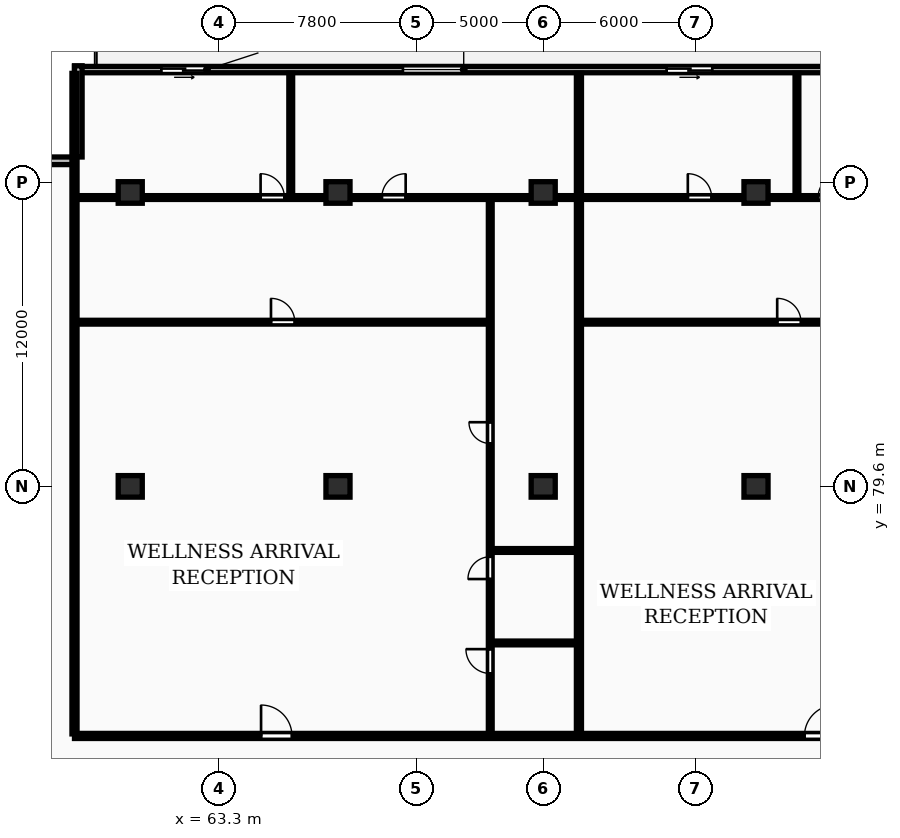
"""IFC4 building model, lengths in metres.
Left out: names, types, materials, properties, quantities, classifications, styles, units other than length and angle.
Written with IfcOpenShell. Run it as: python <this file> out.ifc"""

import sys

from ifc_helpers import new_model, si_unit, direction, frame, frame_2d, origin, origin_2d, place, context, subcontext, project, spatial, rectangle, extrude, element, fill, save


model = new_model("IFC4")
c1 = context("Model", 3, precision=1e-05, world=origin(), true_north=direction((0.0, 1.0)))
c2 = subcontext(c1, "Body", "Model", "MODEL_VIEW")
j1 = project(units=[si_unit("LENGTHUNIT", "METRE"), si_unit("PLANEANGLEUNIT", "RADIAN")], contexts=[c1])
p1 = place(None, origin())
s1 = spatial("IfcSite", under=j1, at=p1, CompositionType="ELEMENT")
p2 = place(p1, origin())
s2 = spatial("IfcBuilding", under=s1, at=p2, CompositionType="ELEMENT")
p3 = place(p2, frame((0.0, 0.0, 119.8)))
s3 = spatial("IfcBuildingStorey", under=s2, at=p3, CompositionType="ELEMENT", Elevation=119.8)
for number, where, z_axis, x_axis in (
    (1, (59.8, 79.6, 0.0), (0.0, 0.0, 1.0), (1.0, 0.0, 0.0)),
    (2, (59.8, 91.2, 0.0), (0.0, 0.0, 1.0), (1.0, 0.0, 0.0)),
    (3, (68.0, 79.6, 0.0), (0.0, 0.0, 1.0), (1.0, 0.0, 0.0)),
    (4, (68.0, 91.2, 0.0), (0.0, 0.0, 1.0), (1.0, 0.0, 0.0)),
    (5, (76.1, 79.6, 0.0), (0.0, 0.0, 1.0), (1.0, 0.0, 0.0)),
    (6, (76.1, 91.2, 0.0), (0.0, 0.0, 1.0), (1.0, 0.0, 0.0)),
    (7, (84.5, 79.6, 0.0), (0.0, 0.0, 1.0), (1.0, 0.0, 0.0)),
    (8, (84.5, 91.2, 0.0), (0.0, 0.0, 1.0), (1.0, 0.0, 0.0)),
):
    element("IfcColumn", number, at=place(p3, frame(where, z_axis=z_axis, x_axis=x_axis)), inside=s3, PredefinedType="COLUMN", context=c2, shape_type="SweptSolid", body=[
        extrude(rectangle(XDim=0.95, YDim=0.85, at=origin_2d()), origin(), (0.0, 0.0, 1.0), 3.25),
    ])
p4 = place(p3, frame((130.6, 96.05, 0.0), z_axis=(0.0, 0.0, 1.0), x_axis=(-1.0, 0.0, 0.0)))
e9 = element("IfcWall", 9, at=p4, inside=s3, PredefinedType="STANDARD", context=c2, shape_type="SweptSolid", body=[
    extrude(rectangle(XDim=73.0, YDim=0.25, at=frame_2d((36.5, 0.0))), origin(), (0.0, 0.0, 1.0), 2.97),
])
p5 = place(p4, frame((67.772, 0.0, 0.0)))
e10 = element("IfcOpeningElement", 10, at=p5, cuts=e9, PredefinedType="OPENING", context=c2, shape_type="SweptSolid", body=[
    extrude(rectangle(XDim=1.8, YDim=2.2, at=frame_2d((0.9, 1.1))), frame((0.0, 0.135, 0.0), z_axis=(0.0, -1.0, 0.0), x_axis=(1.0, 0.0, 0.0)), (0.0, 0.0, 1.0), 0.27),
])
p6 = place(p4, frame((57.637, 0.0, 0.85)))
e11 = element("IfcOpeningElement", 11, at=p6, cuts=e9, PredefinedType="OPENING", context=c2, shape_type="SweptSolid", body=[
    extrude(rectangle(XDim=2.4, YDim=1.9, at=frame_2d((1.2, 0.95))), frame((0.0, 0.135, 0.0), z_axis=(0.0, -1.0, 0.0), x_axis=(1.0, 0.0, 0.0)), (0.0, 0.0, 1.0), 0.27),
])
p7 = place(p4, frame((47.827, 0.0, 0.0)))
e12 = element("IfcOpeningElement", 12, at=p7, cuts=e9, PredefinedType="OPENING", context=c2, shape_type="SweptSolid", body=[
    extrude(rectangle(XDim=1.8, YDim=2.2, at=frame_2d((0.9, 1.1))), frame((0.0, 0.135, 0.0), z_axis=(0.0, -1.0, 0.0), x_axis=(1.0, 0.0, 0.0)), (0.0, 0.0, 1.0), 0.27),
])
p8 = place(p4, frame((37.736, 0.0, 0.85)))
e13 = element("IfcOpeningElement", 13, at=p8, cuts=e9, PredefinedType="OPENING", context=c2, shape_type="SweptSolid", body=[
    extrude(rectangle(XDim=2.4, YDim=1.9, at=frame_2d((1.2, 0.95))), frame((0.0, 0.135, 0.0), z_axis=(0.0, -1.0, 0.0), x_axis=(1.0, 0.0, 0.0)), (0.0, 0.0, 1.0), 0.27),
])
p9 = place(p4, frame((21.9, 0.0, 0.85)))
e14 = element("IfcOpeningElement", 14, at=p9, cuts=e9, PredefinedType="OPENING", context=c2, shape_type="SweptSolid", body=[
    extrude(rectangle(XDim=2.4, YDim=1.9, at=frame_2d((1.2, 0.95))), frame((0.0, 0.135, 0.0), z_axis=(0.0, -1.0, 0.0), x_axis=(1.0, 0.0, 0.0)), (0.0, 0.0, 1.0), 0.27),
])
p10 = place(p4, frame((28.584, 0.0, 0.0)))
e15 = element("IfcOpeningElement", 15, at=p10, cuts=e9, PredefinedType="OPENING", context=c2, shape_type="SweptSolid", body=[
    extrude(rectangle(XDim=1.8, YDim=2.2, at=frame_2d((0.9, 1.1))), frame((0.0, 0.135, 0.0), z_axis=(0.0, -1.0, 0.0), x_axis=(1.0, 0.0, 0.0)), (0.0, 0.0, 1.0), 0.27),
])
p11 = place(p4, frame((16.689, 0.0, 0.85)))
e16 = element("IfcOpeningElement", 16, at=p11, cuts=e9, PredefinedType="OPENING", context=c2, shape_type="SweptSolid", body=[
    extrude(rectangle(XDim=2.4, YDim=1.9, at=frame_2d((1.2, 0.95))), frame((0.0, 0.135, 0.0), z_axis=(0.0, -1.0, 0.0), x_axis=(1.0, 0.0, 0.0)), (0.0, 0.0, 1.0), 0.27),
])
p12 = place(p4, frame((5.475, 0.0, 0.85)))
e17 = element("IfcOpeningElement", 17, at=p12, cuts=e9, PredefinedType="OPENING", context=c2, shape_type="SweptSolid", body=[
    extrude(rectangle(XDim=1.8, YDim=1.8, at=frame_2d((0.9, 0.9))), frame((0.0, 0.135, 0.0), z_axis=(0.0, -1.0, 0.0), x_axis=(1.0, 0.0, 0.0)), (0.0, 0.0, 1.0), 0.27),
])
p13 = place(p4, frame((10.889, 0.0, 0.0)))
e18 = element("IfcOpeningElement", 18, at=p13, cuts=e9, PredefinedType="OPENING", context=c2, shape_type="SweptSolid", body=[
    extrude(rectangle(XDim=1.8, YDim=2.2, at=frame_2d((0.9, 1.1))), frame((0.0, 0.135, 0.0), z_axis=(0.0, -1.0, 0.0), x_axis=(1.0, 0.0, 0.0)), (0.0, 0.0, 1.0), 0.27),
])
p14 = place(p4, frame((1.025, 0.0, 0.85)))
e19 = element("IfcOpeningElement", 19, at=p14, cuts=e9, PredefinedType="OPENING", context=c2, shape_type="SweptSolid", body=[
    extrude(rectangle(XDim=2.4, YDim=1.9, at=frame_2d((1.2, 0.95))), frame((0.0, 0.135, 0.0), z_axis=(0.0, -1.0, 0.0), x_axis=(1.0, 0.0, 0.0)), (0.0, 0.0, 1.0), 0.27),
])
p15 = place(p3, frame((57.75, 96.2, 0.0), z_axis=(0.0, 0.0, 1.0), x_axis=(0.0, -1.0, 0.0)))
e20 = element("IfcWall", 20, at=p15, inside=s3, PredefinedType="STANDARD", context=c2, shape_type="SweptSolid", body=[
    extrude(rectangle(XDim=3.6, YDim=0.3, at=frame_2d((1.8, 0.0))), origin(), (0.0, 0.0, 1.0), 2.97),
])
p16 = place(p3, frame((57.6, 92.45, 0.0), z_axis=(0.0, 0.0, 1.0), x_axis=(-1.0, 0.0, 0.0)))
e21 = element("IfcWall", 21, at=p16, inside=s3, PredefinedType="STANDARD", context=c2, shape_type="SweptSolid", body=[
    extrude(rectangle(XDim=3.6, YDim=0.3, at=frame_2d((1.8, 0.0))), origin(), (0.0, 0.0, 1.0), 2.97),
])
for number, where, z_axis, x_axis in (
    (22, (57.6, 69.83, 0.0), (0.0, 0.0, 1.0), (0.0, 1.0, 0.0)),
    (23, (77.51, 69.83, 0.0), (0.0, 0.0, 1.0), (0.0, 1.0, 0.0)),
):
    element("IfcWall", number, at=place(p3, frame(where, z_axis=z_axis, x_axis=x_axis)), inside=s3, PredefinedType="PARTITIONING", context=c2, shape_type="SweptSolid", body=[
        extrude(rectangle(XDim=26.07, YDim=0.2, at=frame_2d((13.035, 0.0))), origin(), (0.0, 0.0, 1.0), 2.97),
    ])
p17 = place(p3, frame((57.68, 86.08, 0.0), z_axis=(0.0, 0.0, 1.0), x_axis=(1.0, 0.0, 0.0)))
e24 = element("IfcWall", 24, at=p17, inside=s3, PredefinedType="PARTITIONING", context=c2, shape_type="SweptSolid", body=[
    extrude(rectangle(XDim=16.291, YDim=0.15, at=frame_2d((8.145, 0.0))), origin(), (0.0, 0.0, 1.0), 2.97),
])
p18 = place(p17, frame((7.675, 0.0, 0.0)))
e25 = element("IfcOpeningElement", 25, at=p18, cuts=e24, PredefinedType="OPENING", context=c2, shape_type="SweptSolid", body=[
    extrude(rectangle(XDim=0.94, YDim=2.1, at=frame_2d((0.47, 1.05))), frame((0.0, 0.085, 0.0), z_axis=(0.0, -1.0, 0.0), x_axis=(1.0, 0.0, 0.0)), (0.0, 0.0, 1.0), 0.17),
])
for number, where, z_axis, x_axis in (
    (26, (74.071, 73.42, 0.0), (0.0, 0.0, 1.0), (1.0, 0.0, 0.0)),
    (27, (74.071, 77.07, 0.0), (0.0, 0.0, 1.0), (1.0, 0.0, 0.0)),
):
    element("IfcWall", number, at=place(p3, frame(where, z_axis=z_axis, x_axis=x_axis)), inside=s3, PredefinedType="PARTITIONING", context=c2, shape_type="SweptSolid", body=[
        extrude(rectangle(XDim=3.36, YDim=0.15, at=frame_2d((1.68, 0.0))), origin(), (0.0, 0.0, 1.0), 2.97),
    ])
p19 = place(p3, frame((74.01, 69.81, 0.0), z_axis=(0.0, 0.0, 1.0), x_axis=(0.0, 1.0, 0.0)))
e28 = element("IfcWall", 28, at=p19, inside=s3, PredefinedType="PARTITIONING", context=c2, shape_type="SweptSolid", body=[
    extrude(rectangle(XDim=21.13, YDim=0.15, at=frame_2d((10.565, 0.0))), origin(), (0.0, 0.0, 1.0), 2.97),
])
p20 = place(p19, frame((2.406, 0.0, 0.0)))
e29 = element("IfcOpeningElement", 29, at=p20, cuts=e28, PredefinedType="OPENING", context=c2, shape_type="SweptSolid", body=[
    extrude(rectangle(XDim=0.96, YDim=2.1, at=frame_2d((0.48, 1.05))), frame((0.0, 0.085, 0.0), z_axis=(0.0, -1.0, 0.0), x_axis=(1.0, 0.0, 0.0)), (0.0, 0.0, 1.0), 0.17),
])
p21 = place(p19, frame((6.133, 0.0, 0.0)))
e30 = element("IfcOpeningElement", 30, at=p21, cuts=e28, PredefinedType="OPENING", context=c2, shape_type="SweptSolid", body=[
    extrude(rectangle(XDim=0.88, YDim=2.06, at=frame_2d((0.44, 1.03))), frame((0.0, 0.085, 0.0), z_axis=(0.0, -1.0, 0.0), x_axis=(1.0, 0.0, 0.0)), (0.0, 0.0, 1.0), 0.17),
])
p22 = place(p19, frame((11.482, 0.0, 0.0)))
e31 = element("IfcOpeningElement", 31, at=p22, cuts=e28, PredefinedType="OPENING", context=c2, shape_type="SweptSolid", body=[
    extrude(rectangle(XDim=0.84, YDim=2.04, at=frame_2d((0.42, 1.02))), frame((0.0, 0.085, 0.0), z_axis=(0.0, -1.0, 0.0), x_axis=(1.0, 0.0, 0.0)), (0.0, 0.0, 1.0), 0.17),
])
p23 = place(p3, frame((66.135, 91.08, 0.0), z_axis=(0.0, 0.0, 1.0), x_axis=(0.0, 1.0, 0.0)))
e32 = element("IfcWall", 32, at=p23, inside=s3, PredefinedType="PARTITIONING", context=c2, shape_type="SweptSolid", body=[
    extrude(rectangle(XDim=4.82, YDim=0.15, at=frame_2d((2.41, 0.0))), origin(), (0.0, 0.0, 1.0), 2.97),
])
p24 = place(p3, frame((57.68, 91.0, 0.0), z_axis=(0.0, 0.0, 1.0), x_axis=(1.0, 0.0, 0.0)))
e33 = element("IfcWall", 33, at=p24, inside=s3, PredefinedType="PARTITIONING", context=c2, shape_type="SweptSolid", body=[
    extrude(rectangle(XDim=19.75, YDim=0.15, at=frame_2d((9.875, 0.0))), origin(), (0.0, 0.0, 1.0), 2.663),
])
p25 = place(p24, frame((7.265, 0.0, 0.0)))
e34 = element("IfcOpeningElement", 34, at=p25, cuts=e33, PredefinedType="OPENING", context=c2, shape_type="SweptSolid", body=[
    extrude(rectangle(XDim=0.94, YDim=2.1, at=frame_2d((0.47, 1.05))), frame((0.0, 0.085, 0.0), z_axis=(0.0, -1.0, 0.0), x_axis=(1.0, 0.0, 0.0)), (0.0, 0.0, 1.0), 0.17),
])
p26 = place(p24, frame((12.052, 0.0, 0.0)))
e35 = element("IfcOpeningElement", 35, at=p26, cuts=e33, PredefinedType="OPENING", context=c2, shape_type="SweptSolid", body=[
    extrude(rectangle(XDim=0.94, YDim=2.1, at=frame_2d((0.47, 1.05))), frame((0.0, 0.085, 0.0), z_axis=(0.0, -1.0, 0.0), x_axis=(1.0, 0.0, 0.0)), (0.0, 0.0, 1.0), 0.17),
])
p27 = place(p3, frame((77.591, 86.08, 0.0), z_axis=(0.0, 0.0, 1.0), x_axis=(1.0, 0.0, 0.0)))
e36 = element("IfcWall", 36, at=p27, inside=s3, PredefinedType="PARTITIONING", context=c2, shape_type="SweptSolid", body=[
    extrude(rectangle(XDim=16.431, YDim=0.15, at=frame_2d((8.215, 0.0))), origin(), (0.0, 0.0, 1.0), 2.97),
])
p28 = place(p27, frame((7.746, 0.0, 0.0)))
e37 = element("IfcOpeningElement", 37, at=p28, cuts=e36, PredefinedType="OPENING", context=c2, shape_type="SweptSolid", body=[
    extrude(rectangle(XDim=0.94, YDim=2.1, at=frame_2d((0.47, 1.05))), frame((0.0, 0.085, 0.0), z_axis=(0.0, -1.0, 0.0), x_axis=(1.0, 0.0, 0.0)), (0.0, 0.0, 1.0), 0.17),
])
p29 = place(p3, frame((86.116, 91.08, 0.0), z_axis=(0.0, 0.0, 1.0), x_axis=(0.0, 1.0, 0.0)))
e38 = element("IfcWall", 38, at=p29, inside=s3, PredefinedType="PARTITIONING", context=c2, shape_type="SweptSolid", body=[
    extrude(rectangle(XDim=4.82, YDim=0.15, at=frame_2d((2.41, 0.0))), origin(), (0.0, 0.0, 1.0), 2.97),
])
p30 = place(p3, frame((77.591, 91.0, 0.0), z_axis=(0.0, 0.0, 1.0), x_axis=(1.0, 0.0, 0.0)))
e39 = element("IfcWall", 39, at=p30, inside=s3, PredefinedType="PARTITIONING", context=c2, shape_type="SweptSolid", body=[
    extrude(rectangle(XDim=19.661, YDim=0.15, at=frame_2d((9.831, 0.0))), origin(), (0.0, 0.0, 1.0), 2.663),
])
p31 = place(p30, frame((4.218, 0.0, 0.0)))
e40 = element("IfcOpeningElement", 40, at=p31, cuts=e39, PredefinedType="OPENING", context=c2, shape_type="SweptSolid", body=[
    extrude(rectangle(XDim=0.94, YDim=2.1, at=frame_2d((0.47, 1.05))), frame((0.0, 0.085, 0.0), z_axis=(0.0, -1.0, 0.0), x_axis=(1.0, 0.0, 0.0)), (0.0, 0.0, 1.0), 0.17),
])
p32 = place(p30, frame((9.361, 0.0, 0.0)))
e41 = element("IfcOpeningElement", 41, at=p32, cuts=e39, PredefinedType="OPENING", context=c2, shape_type="SweptSolid", body=[
    extrude(rectangle(XDim=0.94, YDim=2.1, at=frame_2d((0.47, 1.05))), frame((0.0, 0.085, 0.0), z_axis=(0.0, -1.0, 0.0), x_axis=(1.0, 0.0, 0.0)), (0.0, 0.0, 1.0), 0.17),
])
p33 = place(p3, frame((57.6, 69.75, 0.0), z_axis=(0.0, 0.0, 1.0), x_axis=(1.0, 0.0, 0.0)))
e42 = element("IfcWall", 42, at=p33, inside=s3, PredefinedType="PARTITIONING", context=c2, shape_type="SweptSolid", body=[
    extrude(rectangle(XDim=73.0, YDim=0.2, at=frame_2d((36.5, 0.0))), origin(), (0.0, 0.0, 1.0), 2.97),
])
p34 = place(p33, frame((7.364, 0.0, 0.0)))
e43 = element("IfcOpeningElement", 43, at=p34, cuts=e42, PredefinedType="OPENING", context=c2, shape_type="SweptSolid", body=[
    extrude(rectangle(XDim=1.22, YDim=2.18, at=frame_2d((0.61, 1.09))), frame((0.0, 0.11, 0.0), z_axis=(0.0, -1.0, 0.0), x_axis=(1.0, 0.0, 0.0)), (0.0, 0.0, 1.0), 0.22),
])
p35 = place(p33, frame((28.813, 0.0, 0.0)))
e44 = element("IfcOpeningElement", 44, at=p35, cuts=e42, PredefinedType="OPENING", context=c2, shape_type="SweptSolid", body=[
    extrude(rectangle(XDim=1.22, YDim=2.18, at=frame_2d((0.61, 1.09))), frame((0.0, 0.11, 0.0), z_axis=(0.0, -1.0, 0.0), x_axis=(1.0, 0.0, 0.0)), (0.0, 0.0, 1.0), 0.22),
])
p36 = place(p33, frame((41.777, 0.0, 0.0)))
e45 = element("IfcOpeningElement", 45, at=p36, cuts=e42, PredefinedType="OPENING", context=c2, shape_type="SweptSolid", body=[
    extrude(rectangle(XDim=0.95, YDim=2.15, at=frame_2d((0.475, 1.075))), frame((0.0, 0.11, 0.0), z_axis=(0.0, -1.0, 0.0), x_axis=(1.0, 0.0, 0.0)), (0.0, 0.0, 1.0), 0.22),
])
p37 = place(p33, frame((59.766, 0.0, 0.0)))
e46 = element("IfcOpeningElement", 46, at=p37, cuts=e42, PredefinedType="OPENING", context=c2, shape_type="SweptSolid", body=[
    extrude(rectangle(XDim=0.95, YDim=2.15, at=frame_2d((0.475, 1.075))), frame((0.0, 0.11, 0.0), z_axis=(0.0, -1.0, 0.0), x_axis=(1.0, 0.0, 0.0)), (0.0, 0.0, 1.0), 0.22),
])
p38 = place(p5, origin())
e47 = element("IfcDoor", 47, at=p38, inside=s3, OperationType="SLIDING_TO_LEFT", PredefinedType="DOOR", context=c2, shape_type="SweptSolid", body=[
    extrude(rectangle(XDim=1.8, YDim=2.2, at=frame_2d((0.9, 1.1))), frame((0.0, 0.025, 0.0), z_axis=(0.0, -1.0, 0.0), x_axis=(1.0, 0.0, 0.0)), (0.0, 0.0, 1.0), 0.05),
])
fill(e10, e47)
p39 = place(p6, origin())
e48 = element("IfcWindow", 48, at=p39, inside=s3, PartitioningType="DOUBLE_PANEL_VERTICAL", PredefinedType="WINDOW", context=c2, shape_type="SweptSolid", body=[
    extrude(rectangle(XDim=2.4, YDim=1.9, at=frame_2d((1.2, 0.95))), frame((0.0, 0.03, 0.0), z_axis=(0.0, -1.0, 0.0), x_axis=(1.0, 0.0, 0.0)), (0.0, 0.0, 1.0), 0.06),
])
fill(e11, e48)
p40 = place(p7, origin())
e49 = element("IfcDoor", 49, at=p40, inside=s3, OperationType="SLIDING_TO_LEFT", PredefinedType="DOOR", context=c2, shape_type="SweptSolid", body=[
    extrude(rectangle(XDim=1.8, YDim=2.2, at=frame_2d((0.9, 1.1))), frame((0.0, 0.025, 0.0), z_axis=(0.0, -1.0, 0.0), x_axis=(1.0, 0.0, 0.0)), (0.0, 0.0, 1.0), 0.05),
])
fill(e12, e49)
p41 = place(p18, origin())
e50 = element("IfcDoor", 50, at=p41, inside=s3, OperationType="SINGLE_SWING_LEFT", PredefinedType="DOOR", context=c2, shape_type="SweptSolid", body=[
    extrude(rectangle(XDim=0.94, YDim=2.1, at=frame_2d((0.47, 1.05))), frame((0.0, 0.025, 0.0), z_axis=(0.0, -1.0, 0.0), x_axis=(1.0, 0.0, 0.0)), (0.0, 0.0, 1.0), 0.05),
])
fill(e25, e50)
p42 = place(p20, origin())
e51 = element("IfcDoor", 51, at=p42, inside=s3, OperationType="SINGLE_SWING_RIGHT", PredefinedType="DOOR", context=c2, shape_type="SweptSolid", body=[
    extrude(rectangle(XDim=0.96, YDim=2.1, at=frame_2d((0.48, 1.05))), frame((0.0, 0.025, 0.0), z_axis=(0.0, -1.0, 0.0), x_axis=(1.0, 0.0, 0.0)), (0.0, 0.0, 1.0), 0.05),
])
fill(e29, e51)
p43 = place(p21, origin())
e52 = element("IfcDoor", 52, at=p43, inside=s3, OperationType="SINGLE_SWING_LEFT", PredefinedType="DOOR", context=c2, shape_type="SweptSolid", body=[
    extrude(rectangle(XDim=0.88, YDim=2.06, at=frame_2d((0.44, 1.03))), frame((0.0, 0.025, 0.0), z_axis=(0.0, -1.0, 0.0), x_axis=(1.0, 0.0, 0.0)), (0.0, 0.0, 1.0), 0.05),
])
fill(e30, e52)
p44 = place(p22, origin())
e53 = element("IfcDoor", 53, at=p44, inside=s3, OperationType="SINGLE_SWING_RIGHT", PredefinedType="DOOR", context=c2, shape_type="SweptSolid", body=[
    extrude(rectangle(XDim=0.84, YDim=2.04, at=frame_2d((0.42, 1.02))), frame((0.0, 0.025, 0.0), z_axis=(0.0, -1.0, 0.0), x_axis=(1.0, 0.0, 0.0)), (0.0, 0.0, 1.0), 0.05),
])
fill(e31, e53)
p45 = place(p25, origin())
e54 = element("IfcDoor", 54, at=p45, inside=s3, OperationType="SINGLE_SWING_LEFT", PredefinedType="DOOR", context=c2, shape_type="SweptSolid", body=[
    extrude(rectangle(XDim=0.94, YDim=2.1, at=frame_2d((0.47, 1.05))), frame((0.0, 0.025, 0.0), z_axis=(0.0, -1.0, 0.0), x_axis=(1.0, 0.0, 0.0)), (0.0, 0.0, 1.0), 0.05),
])
fill(e34, e54)
p46 = place(p26, origin())
e55 = element("IfcDoor", 55, at=p46, inside=s3, OperationType="SINGLE_SWING_RIGHT", PredefinedType="DOOR", context=c2, shape_type="SweptSolid", body=[
    extrude(rectangle(XDim=0.94, YDim=2.1, at=frame_2d((0.47, 1.05))), frame((0.0, 0.025, 0.0), z_axis=(0.0, -1.0, 0.0), x_axis=(1.0, 0.0, 0.0)), (0.0, 0.0, 1.0), 0.05),
])
fill(e35, e55)
p47 = place(p28, origin())
e56 = element("IfcDoor", 56, at=p47, inside=s3, OperationType="SINGLE_SWING_LEFT", PredefinedType="DOOR", context=c2, shape_type="SweptSolid", body=[
    extrude(rectangle(XDim=0.94, YDim=2.1, at=frame_2d((0.47, 1.05))), frame((0.0, 0.025, 0.0), z_axis=(0.0, -1.0, 0.0), x_axis=(1.0, 0.0, 0.0)), (0.0, 0.0, 1.0), 0.05),
])
fill(e37, e56)
p48 = place(p31, origin())
e57 = element("IfcDoor", 57, at=p48, inside=s3, OperationType="SINGLE_SWING_LEFT", PredefinedType="DOOR", context=c2, shape_type="SweptSolid", body=[
    extrude(rectangle(XDim=0.94, YDim=2.1, at=frame_2d((0.47, 1.05))), frame((0.0, 0.025, 0.0), z_axis=(0.0, -1.0, 0.0), x_axis=(1.0, 0.0, 0.0)), (0.0, 0.0, 1.0), 0.05),
])
fill(e40, e57)
p49 = place(p32, origin())
e58 = element("IfcDoor", 58, at=p49, inside=s3, OperationType="SINGLE_SWING_RIGHT", PredefinedType="DOOR", context=c2, shape_type="SweptSolid", body=[
    extrude(rectangle(XDim=0.94, YDim=2.1, at=frame_2d((0.47, 1.05))), frame((0.0, 0.025, 0.0), z_axis=(0.0, -1.0, 0.0), x_axis=(1.0, 0.0, 0.0)), (0.0, 0.0, 1.0), 0.05),
])
fill(e41, e58)
p50 = place(p34, origin())
e59 = element("IfcDoor", 59, at=p50, inside=s3, OperationType="SINGLE_SWING_LEFT", PredefinedType="DOOR", context=c2, shape_type="SweptSolid", body=[
    extrude(rectangle(XDim=1.22, YDim=2.18, at=frame_2d((0.61, 1.09))), frame((0.0, 0.025, 0.0), z_axis=(0.0, -1.0, 0.0), x_axis=(1.0, 0.0, 0.0)), (0.0, 0.0, 1.0), 0.05),
])
fill(e43, e59)
p51 = place(p35, origin())
e60 = element("IfcDoor", 60, at=p51, inside=s3, OperationType="SINGLE_SWING_RIGHT", PredefinedType="DOOR", context=c2, shape_type="SweptSolid", body=[
    extrude(rectangle(XDim=1.22, YDim=2.18, at=frame_2d((0.61, 1.09))), frame((0.0, 0.025, 0.0), z_axis=(0.0, -1.0, 0.0), x_axis=(1.0, 0.0, 0.0)), (0.0, 0.0, 1.0), 0.05),
])
fill(e44, e60)
save(model, sys.argv[1])
